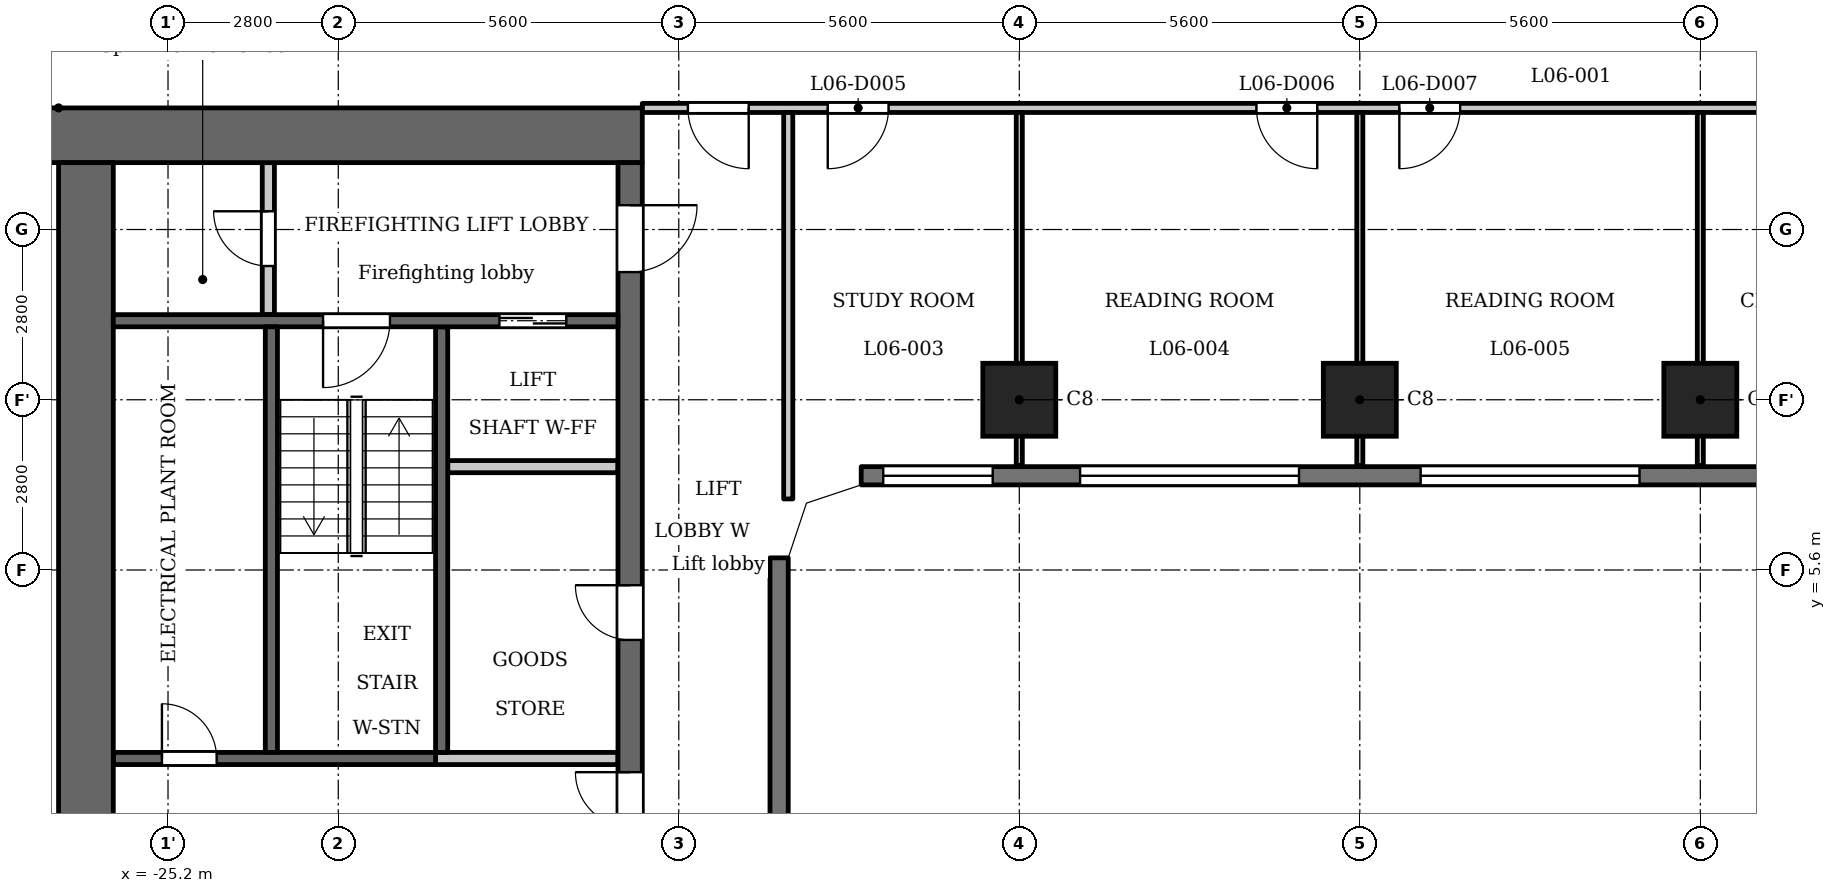
"""IFC4 building model, lengths in metres.
Left out: names, types, materials, properties, quantities, classifications, styles, units other than length and angle.
Written with IfcOpenShell. Run it as: python <this file> out.ifc"""

import sys

from ifc_helpers import new_model, si_unit, direction, frame, frame_2d, origin, origin_2d, place, context, subcontext, project, spatial, polyline, rectangle, outline, extrude, element, fill, save


model = new_model("IFC4")
c1 = context("Model", 3, precision=1e-05, world=origin(), true_north=direction((0.0, 1.0)))
c2 = subcontext(c1, "Body", "Model", "MODEL_VIEW")
j1 = project(units=[si_unit("LENGTHUNIT", "METRE"), si_unit("PLANEANGLEUNIT", "RADIAN")], contexts=[c1])
p1 = place(None, origin())
s1 = spatial("IfcSite", under=j1, at=p1, CompositionType="ELEMENT")
p2 = place(p1, origin())
s2 = spatial("IfcBuilding", under=s1, at=p2, CompositionType="ELEMENT")
p3 = place(p2, frame((0.0, 0.0, 30.5)))
s3 = spatial("IfcBuildingStorey", under=s2, at=p3, CompositionType="ELEMENT", Elevation=30.5)
for number, where, z_axis, x_axis in (
    (1, (-11.2, 8.4, 0.0), (0.0, 0.0, 1.0), (1.0, 0.0, 0.0)),
    (2, (-5.6, 8.4, 0.0), (0.0, 0.0, 1.0), (1.0, 0.0, 0.0)),
    (3, (0.0, 8.4, 0.0), (0.0, 0.0, 1.0), (1.0, 0.0, 0.0)),
):
    element("IfcColumn", number, at=place(p3, frame(where, z_axis=z_axis, x_axis=x_axis)), inside=s3, PredefinedType="COLUMN", context=c2, shape_type="SweptSolid", body=[
        extrude(rectangle(XDim=1.2, YDim=1.2, at=origin_2d()), origin(), (0.0, 0.0, 1.0), 3.5),
    ])
p4 = place(p3, frame((-15.15, -5.8, 0.0), z_axis=(0.0, 0.0, 1.0), x_axis=(0.0, 1.0, 0.0)))
e4 = element("IfcWall", 4, at=p4, inside=s3, PredefinedType="SOLIDWALL", context=c2, shape_type="SweptSolid", body=[
    extrude(rectangle(XDim=11.6, YDim=0.3, at=frame_2d((5.8, 0.0))), origin(), (0.0, 0.0, 1.0), 3.2),
])
p5 = place(p3, frame((-13.8, 7.15, 0.0), z_axis=(0.0, 0.0, 1.0), x_axis=(1.0, 0.0, 0.0)))
e5 = element("IfcWall", 5, at=p5, inside=s3, PredefinedType="SOLIDWALL", context=c2, shape_type="SweptSolid", body=[
    extrude(rectangle(XDim=27.6, YDim=0.3, at=frame_2d((13.8, 0.0))), origin(), (0.0, 0.0, 1.0), 3.2),
])
p6 = place(p5, frame((0.363, 0.0, 0.9)))
e6 = element("IfcOpeningElement", 6, at=p6, cuts=e5, PredefinedType="OPENING", context=c2, shape_type="SweptSolid", body=[
    extrude(rectangle(XDim=1.8, YDim=1.25, at=frame_2d((0.9, 0.625))), frame((0.0, 0.16, 0.0), z_axis=(0.0, -1.0, 0.0), x_axis=(1.0, 0.0, 0.0)), (0.0, 0.0, 1.0), 0.32),
])
p7 = place(p5, frame((3.6, 0.0, 1.2)))
e7 = element("IfcOpeningElement", 7, at=p7, cuts=e5, PredefinedType="OPENING", context=c2, shape_type="SweptSolid", body=[
    extrude(rectangle(XDim=3.6, YDim=0.95, at=frame_2d((1.8, 0.475))), frame((0.0, 0.16, 0.0), z_axis=(0.0, -1.0, 0.0), x_axis=(1.0, 0.0, 0.0)), (0.0, 0.0, 1.0), 0.32),
])
p8 = place(p5, frame((9.2, 0.0, 1.2)))
e8 = element("IfcOpeningElement", 8, at=p8, cuts=e5, PredefinedType="OPENING", context=c2, shape_type="SweptSolid", body=[
    extrude(rectangle(XDim=3.6, YDim=0.95, at=frame_2d((1.8, 0.475))), frame((0.0, 0.16, 0.0), z_axis=(0.0, -1.0, 0.0), x_axis=(1.0, 0.0, 0.0)), (0.0, 0.0, 1.0), 0.32),
])
p9 = place(p5, frame((14.8, 0.0, 1.2)))
e9 = element("IfcOpeningElement", 9, at=p9, cuts=e5, PredefinedType="OPENING", context=c2, shape_type="SweptSolid", body=[
    extrude(rectangle(XDim=3.6, YDim=0.95, at=frame_2d((1.8, 0.475))), frame((0.0, 0.16, 0.0), z_axis=(0.0, -1.0, 0.0), x_axis=(1.0, 0.0, 0.0)), (0.0, 0.0, 1.0), 0.32),
])
p10 = place(p5, frame((20.4, 0.0, 1.2)))
e10 = element("IfcOpeningElement", 10, at=p10, cuts=e5, PredefinedType="OPENING", context=c2, shape_type="SweptSolid", body=[
    extrude(rectangle(XDim=3.6, YDim=0.95, at=frame_2d((1.8, 0.475))), frame((0.0, 0.16, 0.0), z_axis=(0.0, -1.0, 0.0), x_axis=(1.0, 0.0, 0.0)), (0.0, 0.0, 1.0), 0.32),
])
p11 = place(p5, frame((25.438, 0.0, 0.9)))
e11 = element("IfcOpeningElement", 11, at=p11, cuts=e5, PredefinedType="OPENING", context=c2, shape_type="SweptSolid", body=[
    extrude(rectangle(XDim=1.8, YDim=1.25, at=frame_2d((0.9, 0.625))), frame((0.0, 0.16, 0.0), z_axis=(0.0, -1.0, 0.0), x_axis=(1.0, 0.0, 0.0)), (0.0, 0.0, 1.0), 0.32),
])
p12 = place(p3, frame((-20.7, 2.6, 0.0), z_axis=(0.0, 0.0, 1.0), x_axis=(0.0, 1.0, 0.0)))
e12 = element("IfcWall", 12, at=p12, inside=s3, PredefinedType="SHEAR", context=c2, shape_type="SweptSolid", body=[
    extrude(rectangle(XDim=7.0, YDim=0.2, at=frame_2d((3.5, 0.0))), origin(), (0.0, 0.0, 1.0), 3.2),
])
p13 = place(p3, frame((-20.8, 2.5, 0.0), z_axis=(0.0, 0.0, 1.0), x_axis=(-1.0, 0.0, 0.0)))
e13 = element("IfcWall", 13, at=p13, inside=s3, PredefinedType="SHEAR", context=c2, shape_type="SweptSolid", body=[
    extrude(rectangle(XDim=5.3, YDim=0.2, at=frame_2d((2.65, 0.0))), origin(), (0.0, 0.0, 1.0), 3.2),
])
p14 = place(p13, frame((3.6, 0.0, 0.0)))
e14 = element("IfcOpeningElement", 14, at=p14, cuts=e13, PredefinedType="OPENING", context=c2, shape_type="SweptSolid", body=[
    extrude(rectangle(XDim=0.9, YDim=2.1, at=frame_2d((0.45, 1.05))), frame((0.0, 0.11, 0.0), z_axis=(0.0, -1.0, 0.0), x_axis=(1.0, 0.0, 0.0)), (0.0, 0.0, 1.0), 0.22),
])
p15 = place(p3, frame((-17.4, 12.75, 0.0), z_axis=(0.0, 0.0, 1.0), x_axis=(-1.0, 0.0, 0.0)))
e15 = element("IfcWall", 15, at=p15, inside=s3, PredefinedType="SHEAR", context=c2, shape_type="SweptSolid", body=[
    extrude(rectangle(XDim=10.4, YDim=0.9, at=frame_2d((5.2, 0.0))), origin(), (0.0, 0.0, 1.0), 3.2),
])
p16 = place(p3, frame((-17.6, -12.3, 0.0), z_axis=(0.0, 0.0, 1.0), x_axis=(0.0, 1.0, 0.0)))
e16 = element("IfcWall", 16, at=p16, inside=s3, PredefinedType="SHEAR", context=c2, shape_type="SweptSolid", body=[
    extrude(rectangle(XDim=24.6, YDim=0.4, at=frame_2d((12.3, 0.0))), origin(), (0.0, 0.0, 1.0), 3.2),
])
p17 = place(p16, frame((6.0, 0.0, 0.0)))
e17 = element("IfcOpeningElement", 17, at=p17, cuts=e16, PredefinedType="OPENING", context=c2, shape_type="SweptSolid", body=[
    extrude(rectangle(XDim=1.1, YDim=2.1, at=frame_2d((0.55, 1.05))), frame((0.0, 0.21, 0.0), z_axis=(0.0, -1.0, 0.0), x_axis=(1.0, 0.0, 0.0)), (0.0, 0.0, 1.0), 0.42),
])
p18 = place(p16, frame((8.4, 0.0, 0.0)))
e18 = element("IfcOpeningElement", 18, at=p18, cuts=e16, PredefinedType="OPENING", context=c2, shape_type="SweptSolid", body=[
    extrude(rectangle(XDim=1.1, YDim=2.1, at=frame_2d((0.55, 1.05))), frame((0.0, 0.21, 0.0), z_axis=(0.0, -1.0, 0.0), x_axis=(1.0, 0.0, 0.0)), (0.0, 0.0, 1.0), 0.42),
])
p19 = place(p16, frame((10.8, 0.0, 0.0)))
e19 = element("IfcOpeningElement", 19, at=p19, cuts=e16, PredefinedType="OPENING", context=c2, shape_type="SweptSolid", body=[
    extrude(rectangle(XDim=1.1, YDim=2.1, at=frame_2d((0.55, 1.05))), frame((0.0, 0.21, 0.0), z_axis=(0.0, -1.0, 0.0), x_axis=(1.0, 0.0, 0.0)), (0.0, 0.0, 1.0), 0.42),
])
p20 = place(p16, frame((16.75, 0.0, 0.0)))
e20 = element("IfcOpeningElement", 20, at=p20, cuts=e16, PredefinedType="OPENING", context=c2, shape_type="SweptSolid", body=[
    extrude(rectangle(XDim=0.9, YDim=2.1, at=frame_2d((0.45, 1.05))), frame((0.0, 0.21, 0.0), z_axis=(0.0, -1.0, 0.0), x_axis=(1.0, 0.0, 0.0)), (0.0, 0.0, 1.0), 0.42),
])
p21 = place(p16, frame((22.8, 0.0, 0.0)))
e21 = element("IfcOpeningElement", 21, at=p21, cuts=e16, PredefinedType="OPENING", context=c2, shape_type="SweptSolid", body=[
    extrude(rectangle(XDim=1.1, YDim=2.1, at=frame_2d((0.55, 1.05))), frame((0.0, 0.21, 0.0), z_axis=(0.0, -1.0, 0.0), x_axis=(1.0, 0.0, 0.0)), (0.0, 0.0, 1.0), 0.42),
])
p22 = place(p16, frame((0.7, 0.0, 0.0)))
e22 = element("IfcOpeningElement", 22, at=p22, cuts=e16, PredefinedType="OPENING", context=c2, shape_type="SweptSolid", body=[
    extrude(rectangle(XDim=1.1, YDim=2.1, at=frame_2d((0.55, 1.05))), frame((0.0, 0.21, 0.0), z_axis=(0.0, -1.0, 0.0), x_axis=(1.0, 0.0, 0.0)), (0.0, 0.0, 1.0), 0.42),
])
p23 = place(p16, frame((12.775, 0.0, 0.0)))
e23 = element("IfcOpeningElement", 23, at=p23, cuts=e16, PredefinedType="OPENING", context=c2, shape_type="SweptSolid", body=[
    extrude(rectangle(XDim=1.8, YDim=2.1, at=frame_2d((0.9, 1.05))), frame((0.0, 0.21, 0.0), z_axis=(0.0, -1.0, 0.0), x_axis=(1.0, 0.0, 0.0)), (0.0, 0.0, 1.0), 0.42),
])
p24 = place(p3, frame((-26.55, -12.3, 0.0), z_axis=(0.0, 0.0, 1.0), x_axis=(0.0, 1.0, 0.0)))
e24 = element("IfcWall", 24, at=p24, inside=s3, PredefinedType="SHEAR", context=c2, shape_type="SweptSolid", body=[
    extrude(rectangle(XDim=24.6, YDim=0.9, at=frame_2d((12.3, 0.0))), origin(), (0.0, 0.0, 1.0), 3.2),
])
p25 = place(p3, frame((-23.55, 9.8, 0.0), z_axis=(0.0, 0.0, 1.0), x_axis=(0.0, 1.0, 0.0)))
e25 = element("IfcWall", 25, at=p25, inside=s3, PredefinedType="PARTITIONING", context=c2, shape_type="SweptSolid", body=[
    extrude(rectangle(XDim=2.5, YDim=0.2, at=frame_2d((1.25, 0.0))), origin(), (0.0, 0.0, 1.0), 3.2),
])
p26 = place(p25, frame((0.8, 0.0, 0.0)))
e26 = element("IfcOpeningElement", 26, at=p26, cuts=e25, PredefinedType="OPENING", context=c2, shape_type="SweptSolid", body=[
    extrude(rectangle(XDim=0.9, YDim=2.1, at=frame_2d((0.45, 1.05))), frame((0.0, 0.11, 0.0), z_axis=(0.0, -1.0, 0.0), x_axis=(1.0, 0.0, 0.0)), (0.0, 0.0, 1.0), 0.22),
])
p27 = place(p3, frame((-17.8, 2.5, 0.0), z_axis=(0.0, 0.0, 1.0), x_axis=(-1.0, 0.0, 0.0)))
e27 = element("IfcWall", 27, at=p27, inside=s3, PredefinedType="PARTITIONING", context=c2, shape_type="SweptSolid", body=[
    extrude(rectangle(XDim=3.0, YDim=0.2, at=frame_2d((1.5, 0.0))), origin(), (0.0, 0.0, 1.0), 3.2),
])
p28 = place(p3, frame((-17.8, 7.3, 0.0), z_axis=(0.0, 0.0, 1.0), x_axis=(-1.0, 0.0, 0.0)))
e28 = element("IfcWall", 28, at=p28, inside=s3, PredefinedType="PARTITIONING", context=c2, shape_type="SweptSolid", body=[
    extrude(rectangle(XDim=2.8, YDim=0.2, at=frame_2d((1.4, 0.0))), origin(), (0.0, 0.0, 1.0), 3.2),
])
p29 = place(p3, frame((-17.8, 9.7, 0.0), z_axis=(0.0, 0.0, 1.0), x_axis=(-1.0, 0.0, 0.0)))
e29 = element("IfcWall", 29, at=p29, inside=s3, PredefinedType="SHEAR", context=c2, shape_type="SweptSolid", body=[
    extrude(rectangle(XDim=8.3, YDim=0.2, at=frame_2d((4.15, 0.0))), origin(), (0.0, 0.0, 1.0), 3.2),
])
p30 = place(p29, frame((0.85, 0.0, 0.0)))
e30 = element("IfcOpeningElement", 30, at=p30, cuts=e29, PredefinedType="OPENING", context=c2, shape_type="SweptSolid", body=[
    extrude(rectangle(XDim=1.1, YDim=2.1, at=frame_2d((0.55, 1.05))), frame((0.0, 0.11, 0.0), z_axis=(0.0, -1.0, 0.0), x_axis=(1.0, 0.0, 0.0)), (0.0, 0.0, 1.0), 0.22),
])
p31 = place(p29, frame((3.75, 0.0, 0.0)))
e31 = element("IfcOpeningElement", 31, at=p31, cuts=e29, PredefinedType="OPENING", context=c2, shape_type="SweptSolid", body=[
    extrude(rectangle(XDim=1.1, YDim=2.1, at=frame_2d((0.55, 1.05))), frame((0.0, 0.11, 0.0), z_axis=(0.0, -1.0, 0.0), x_axis=(1.0, 0.0, 0.0)), (0.0, 0.0, 1.0), 0.22),
])
p32 = place(p3, frame((-23.5, 2.6, 0.0), z_axis=(0.0, 0.0, 1.0), x_axis=(0.0, 1.0, 0.0)))
e32 = element("IfcWall", 32, at=p32, inside=s3, PredefinedType="SHEAR", context=c2, shape_type="SweptSolid", body=[
    extrude(rectangle(XDim=7.0, YDim=0.2, at=frame_2d((3.5, 0.0))), origin(), (0.0, 0.0, 1.0), 3.2),
])
p33 = place(p3, frame((-17.4, 13.2, 0.0), z_axis=(0.0, 0.0, 1.0), x_axis=(1.0, 0.0, 0.0)))
e33 = element("IfcWall", 33, at=p33, inside=s3, PredefinedType="PARTITIONING", context=c2, shape_type="SweptSolid", body=[
    extrude(rectangle(XDim=34.8, YDim=0.15, at=frame_2d((17.4, 0.0))), origin(), (0.0, 0.0, 1.0), 3.2),
])
p34 = place(p33, frame((0.75, 0.0, 0.0)))
e34 = element("IfcOpeningElement", 34, at=p34, cuts=e33, PredefinedType="OPENING", context=c2, shape_type="SweptSolid", body=[
    extrude(rectangle(XDim=1.0, YDim=2.1, at=frame_2d((0.5, 1.05))), frame((0.0, 0.085, 0.0), z_axis=(0.0, -1.0, 0.0), x_axis=(1.0, 0.0, 0.0)), (0.0, 0.0, 1.0), 0.17),
])
p35 = place(p33, frame((33.15, 0.0, 0.0)))
e35 = element("IfcOpeningElement", 35, at=p35, cuts=e33, PredefinedType="OPENING", context=c2, shape_type="SweptSolid", body=[
    extrude(rectangle(XDim=1.0, YDim=2.1, at=frame_2d((0.5, 1.05))), frame((0.0, 0.085, 0.0), z_axis=(0.0, -1.0, 0.0), x_axis=(1.0, 0.0, 0.0)), (0.0, 0.0, 1.0), 0.17),
])
p36 = place(p33, frame((3.05, 0.0, 0.0)))
e36 = element("IfcOpeningElement", 36, at=p36, cuts=e33, PredefinedType="OPENING", context=c2, shape_type="SweptSolid", body=[
    extrude(rectangle(XDim=1.0, YDim=2.1, at=frame_2d((0.5, 1.05))), frame((0.0, 0.085, 0.0), z_axis=(0.0, -1.0, 0.0), x_axis=(1.0, 0.0, 0.0)), (0.0, 0.0, 1.0), 0.17),
])
p37 = place(p33, frame((10.1, 0.0, 0.0)))
e37 = element("IfcOpeningElement", 37, at=p37, cuts=e33, PredefinedType="OPENING", context=c2, shape_type="SweptSolid", body=[
    extrude(rectangle(XDim=1.0, YDim=2.1, at=frame_2d((0.5, 1.05))), frame((0.0, 0.085, 0.0), z_axis=(0.0, -1.0, 0.0), x_axis=(1.0, 0.0, 0.0)), (0.0, 0.0, 1.0), 0.17),
])
p38 = place(p33, frame((12.45, 0.0, 0.0)))
e38 = element("IfcOpeningElement", 38, at=p38, cuts=e33, PredefinedType="OPENING", context=c2, shape_type="SweptSolid", body=[
    extrude(rectangle(XDim=1.0, YDim=2.1, at=frame_2d((0.5, 1.05))), frame((0.0, 0.085, 0.0), z_axis=(0.0, -1.0, 0.0), x_axis=(1.0, 0.0, 0.0)), (0.0, 0.0, 1.0), 0.17),
])
p39 = place(p33, frame((21.3, 0.0, 0.0)))
e39 = element("IfcOpeningElement", 39, at=p39, cuts=e33, PredefinedType="OPENING", context=c2, shape_type="SweptSolid", body=[
    extrude(rectangle(XDim=1.0, YDim=2.1, at=frame_2d((0.5, 1.05))), frame((0.0, 0.085, 0.0), z_axis=(0.0, -1.0, 0.0), x_axis=(1.0, 0.0, 0.0)), (0.0, 0.0, 1.0), 0.17),
])
p40 = place(p33, frame((23.65, 0.0, 0.0)))
e40 = element("IfcOpeningElement", 40, at=p40, cuts=e33, PredefinedType="OPENING", context=c2, shape_type="SweptSolid", body=[
    extrude(rectangle(XDim=1.0, YDim=2.1, at=frame_2d((0.5, 1.05))), frame((0.0, 0.085, 0.0), z_axis=(0.0, -1.0, 0.0), x_axis=(1.0, 0.0, 0.0)), (0.0, 0.0, 1.0), 0.17),
])
p41 = place(p33, frame((30.75, 0.0, 0.0)))
e41 = element("IfcOpeningElement", 41, at=p41, cuts=e33, PredefinedType="OPENING", context=c2, shape_type="SweptSolid", body=[
    extrude(rectangle(XDim=1.0, YDim=2.1, at=frame_2d((0.5, 1.05))), frame((0.0, 0.085, 0.0), z_axis=(0.0, -1.0, 0.0), x_axis=(1.0, 0.0, 0.0)), (0.0, 0.0, 1.0), 0.17),
])
p42 = place(p3, frame((-15.0, 6.769, 0.0), z_axis=(0.0, 0.0, 1.0), x_axis=(0.0, 1.0, 0.0)))
e42 = element("IfcWall", 42, at=p42, inside=s3, PredefinedType="PARTITIONING", context=c2, shape_type="SweptSolid", body=[
    extrude(rectangle(XDim=6.356, YDim=0.15, at=frame_2d((3.178, 0.0))), origin(), (0.0, 0.0, 1.0), 3.2),
])
for number, where, z_axis, x_axis in (
    (43, (-11.2, 7.32, 0.0), (0.0, 0.0, 1.0), (0.0, 1.0, 0.0)),
    (44, (-5.6, 7.32, 0.0), (0.0, 0.0, 1.0), (0.0, 1.0, 0.0)),
    (45, (0.0, 7.32, 0.0), (0.0, 0.0, 1.0), (0.0, 1.0, 0.0)),
):
    element("IfcWall", number, at=place(p3, frame(where, z_axis=z_axis, x_axis=x_axis)), inside=s3, PredefinedType="PARTITIONING", context=c2, shape_type="SweptSolid", body=[
        extrude(rectangle(XDim=5.805, YDim=0.1, at=frame_2d((2.902, 0.0))), origin(), (0.0, 0.0, 1.0), 3.2),
    ])
p43 = place(p3, origin())
e46 = element("IfcWall", 46, at=p43, inside=s3, PredefinedType="SOLIDWALL", context=c2, shape_type="SweptSolid", body=[
    extrude(outline(polyline([(-13.849, 7.3), (-14.937, 6.937), (-15.3, 5.849), (-15.3, 5.8), (-15.0, 5.8), (-14.7, 6.7), (-13.8, 7.0), (-13.8, 7.3), (-13.849, 7.3)])), origin(), (0.0, 0.0, 1.0), 3.2),
])
p44 = place(p20, origin())
e47 = element("IfcDoor", 47, at=p44, inside=s3, OperationType="SINGLE_SWING_LEFT", PredefinedType="DOOR", context=c2, shape_type="SweptSolid", body=[
    extrude(rectangle(XDim=0.9, YDim=2.1, at=frame_2d((0.45, 1.05))), frame((0.0, 0.025, 0.0), z_axis=(0.0, -1.0, 0.0), x_axis=(1.0, 0.0, 0.0)), (0.0, 0.0, 1.0), 0.05),
])
fill(e20, e47)
p45 = place(p30, origin())
e48 = element("IfcDoor", 48, at=p45, inside=s3, OperationType="DOUBLE_DOOR_SLIDING", PredefinedType="DOOR", context=c2, shape_type="SweptSolid", body=[
    extrude(rectangle(XDim=1.1, YDim=2.1, at=frame_2d((0.55, 1.05))), frame((0.0, 0.025, 0.0), z_axis=(0.0, -1.0, 0.0), x_axis=(1.0, 0.0, 0.0)), (0.0, 0.0, 1.0), 0.05),
])
fill(e30, e48)
p46 = place(p21, origin())
e49 = element("IfcDoor", 49, at=p46, inside=s3, OperationType="SINGLE_SWING_RIGHT", PredefinedType="DOOR", context=c2, shape_type="SweptSolid", body=[
    extrude(rectangle(XDim=1.1, YDim=2.1, at=frame_2d((0.55, 1.05))), frame((0.0, 0.025, 0.0), z_axis=(0.0, -1.0, 0.0), x_axis=(1.0, 0.0, 0.0)), (0.0, 0.0, 1.0), 0.05),
])
fill(e21, e49)
p47 = place(p26, origin())
e50 = element("IfcDoor", 50, at=p47, inside=s3, OperationType="SINGLE_SWING_LEFT", PredefinedType="DOOR", context=c2, shape_type="SweptSolid", body=[
    extrude(rectangle(XDim=0.9, YDim=2.1, at=frame_2d((0.45, 1.05))), frame((0.0, 0.025, 0.0), z_axis=(0.0, -1.0, 0.0), x_axis=(1.0, 0.0, 0.0)), (0.0, 0.0, 1.0), 0.05),
])
fill(e26, e50)
p48 = place(p31, origin())
e51 = element("IfcDoor", 51, at=p48, inside=s3, OperationType="SINGLE_SWING_LEFT", PredefinedType="DOOR", context=c2, shape_type="SweptSolid", body=[
    extrude(rectangle(XDim=1.1, YDim=2.1, at=frame_2d((0.55, 1.05))), frame((0.0, 0.025, 0.0), z_axis=(0.0, -1.0, 0.0), x_axis=(1.0, 0.0, 0.0)), (0.0, 0.0, 1.0), 0.05),
])
fill(e31, e51)
p49 = place(p23, origin())
e52 = element("IfcDoor", 52, at=p49, inside=s3, OperationType="DOUBLE_DOOR_SINGLE_SWING", PredefinedType="DOOR", context=c2, shape_type="SweptSolid", body=[
    extrude(rectangle(XDim=1.8, YDim=2.1, at=frame_2d((0.9, 1.05))), frame((0.0, 0.025, 0.0), z_axis=(0.0, -1.0, 0.0), x_axis=(1.0, 0.0, 0.0)), (0.0, 0.0, 1.0), 0.05),
])
fill(e23, e52)
p50 = place(p14, origin())
e53 = element("IfcDoor", 53, at=p50, inside=s3, OperationType="SINGLE_SWING_RIGHT", PredefinedType="DOOR", context=c2, shape_type="SweptSolid", body=[
    extrude(rectangle(XDim=0.9, YDim=2.1, at=frame_2d((0.45, 1.05))), frame((0.0, 0.025, 0.0), z_axis=(0.0, -1.0, 0.0), x_axis=(1.0, 0.0, 0.0)), (0.0, 0.0, 1.0), 0.05),
])
fill(e14, e53)
p51 = place(p34, origin())
e54 = element("IfcDoor", 54, at=p51, inside=s3, OperationType="SINGLE_SWING_RIGHT", PredefinedType="DOOR", context=c2, shape_type="SweptSolid", body=[
    extrude(rectangle(XDim=1.0, YDim=2.1, at=frame_2d((0.5, 1.05))), frame((0.0, 0.025, 0.0), z_axis=(0.0, -1.0, 0.0), x_axis=(1.0, 0.0, 0.0)), (0.0, 0.0, 1.0), 0.05),
])
fill(e34, e54)
p52 = place(p36, origin())
e55 = element("IfcDoor", 55, at=p52, inside=s3, OperationType="SINGLE_SWING_LEFT", PredefinedType="DOOR", context=c2, shape_type="SweptSolid", body=[
    extrude(rectangle(XDim=1.0, YDim=2.1, at=frame_2d((0.5, 1.05))), frame((0.0, 0.025, 0.0), z_axis=(0.0, -1.0, 0.0), x_axis=(1.0, 0.0, 0.0)), (0.0, 0.0, 1.0), 0.05),
])
fill(e36, e55)
p53 = place(p37, origin())
e56 = element("IfcDoor", 56, at=p53, inside=s3, OperationType="SINGLE_SWING_RIGHT", PredefinedType="DOOR", context=c2, shape_type="SweptSolid", body=[
    extrude(rectangle(XDim=1.0, YDim=2.1, at=frame_2d((0.5, 1.05))), frame((0.0, 0.025, 0.0), z_axis=(0.0, -1.0, 0.0), x_axis=(1.0, 0.0, 0.0)), (0.0, 0.0, 1.0), 0.05),
])
fill(e37, e56)
p54 = place(p38, origin())
e57 = element("IfcDoor", 57, at=p54, inside=s3, OperationType="SINGLE_SWING_LEFT", PredefinedType="DOOR", context=c2, shape_type="SweptSolid", body=[
    extrude(rectangle(XDim=1.0, YDim=2.1, at=frame_2d((0.5, 1.05))), frame((0.0, 0.025, 0.0), z_axis=(0.0, -1.0, 0.0), x_axis=(1.0, 0.0, 0.0)), (0.0, 0.0, 1.0), 0.05),
])
fill(e38, e57)
p55 = place(p6, origin())
e58 = element("IfcWindow", 58, at=p55, inside=s3, PartitioningType="SINGLE_PANEL", PredefinedType="WINDOW", context=c2, shape_type="SweptSolid", body=[
    extrude(rectangle(XDim=1.8, YDim=1.25, at=frame_2d((0.9, 0.625))), frame((0.0, 0.03, 0.0), z_axis=(0.0, -1.0, 0.0), x_axis=(1.0, 0.0, 0.0)), (0.0, 0.0, 1.0), 0.06),
])
fill(e6, e58)
p56 = place(p7, origin())
e59 = element("IfcWindow", 59, at=p56, inside=s3, PartitioningType="SINGLE_PANEL", PredefinedType="WINDOW", context=c2, shape_type="SweptSolid", body=[
    extrude(rectangle(XDim=3.6, YDim=0.95, at=frame_2d((1.8, 0.475))), frame((0.0, 0.03, 0.0), z_axis=(0.0, -1.0, 0.0), x_axis=(1.0, 0.0, 0.0)), (0.0, 0.0, 1.0), 0.06),
])
fill(e7, e59)
p57 = place(p8, origin())
e60 = element("IfcWindow", 60, at=p57, inside=s3, PartitioningType="SINGLE_PANEL", PredefinedType="WINDOW", context=c2, shape_type="SweptSolid", body=[
    extrude(rectangle(XDim=3.6, YDim=0.95, at=frame_2d((1.8, 0.475))), frame((0.0, 0.03, 0.0), z_axis=(0.0, -1.0, 0.0), x_axis=(1.0, 0.0, 0.0)), (0.0, 0.0, 1.0), 0.06),
])
fill(e8, e60)
save(model, sys.argv[1])
